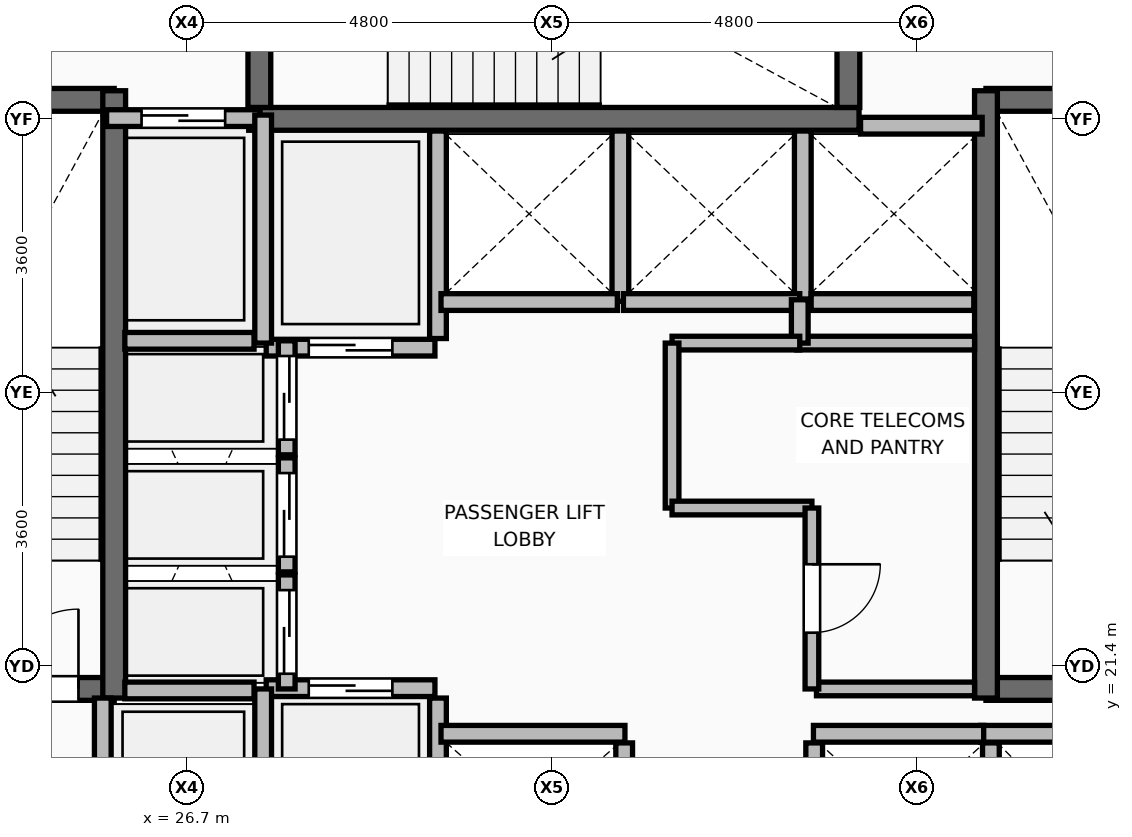
"""IFC4 building model, lengths in metres.
Left out: names, types, materials, properties, quantities, classifications, styles, units other than length and angle.
Written with IfcOpenShell. Run it as: python <this file> out.ifc"""

import sys

from ifc_helpers import new_model, si_unit, direction, frame, frame_2d, origin, place, context, subcontext, project, spatial, rectangle, extrude, element, fill, save


model = new_model("IFC4")
c1 = context("Model", 3, precision=1e-05, world=origin(), true_north=direction((0.0, 1.0)))
c2 = subcontext(c1, "Body", "Model", "MODEL_VIEW")
j1 = project(units=[si_unit("LENGTHUNIT", "METRE"), si_unit("PLANEANGLEUNIT", "RADIAN")], contexts=[c1])
p1 = place(None, origin())
s1 = spatial("IfcSite", under=j1, at=p1, CompositionType="ELEMENT")
p2 = place(p1, origin())
s2 = spatial("IfcBuilding", under=s1, at=p2, CompositionType="ELEMENT")
p3 = place(p2, frame((0.0, 0.0, 79.5)))
s3 = spatial("IfcBuildingStorey", under=s2, at=p3, CompositionType="ELEMENT", Elevation=79.5)
p4 = place(p3, frame((30.0, 18.08, 0.0), z_axis=(0.0, 0.0, 1.0), x_axis=(0.0, 1.0, 0.0)))
e1 = element("IfcWall", 1, at=p4, inside=s3, PredefinedType="PARTITIONING", context=c2, shape_type="SweptSolid", body=[
    extrude(rectangle(XDim=2.9, YDim=0.22, at=frame_2d((1.45, 0.0))), origin(), (0.0, 0.0, 1.0), 3.545),
])
for number, where, z_axis, x_axis in (
    (2, (32.45, 17.92, 0.0), (0.0, 0.0, 1.0), (0.0, 1.0, 0.0)),
    (3, (34.95, 17.92, 0.0), (0.0, 0.0, 1.0), (0.0, 1.0, 0.0)),
):
    element("IfcWall", number, at=place(p3, frame(where, z_axis=z_axis, x_axis=x_axis)), inside=s3, PredefinedType="PARTITIONING", context=c2, shape_type="SweptSolid", body=[
        extrude(rectangle(XDim=2.47, YDim=0.22, at=frame_2d((1.235, 0.0))), origin(), (0.0, 0.0, 1.0), 2.928),
    ])
p5 = place(p3, frame((37.275, 18.08, 0.0), z_axis=(0.0, 0.0, 1.0), x_axis=(0.0, 1.0, 0.0)))
e4 = element("IfcWall", 4, at=p5, inside=s3, PredefinedType="PARTITIONING", context=c2, shape_type="SweptSolid", body=[
    extrude(rectangle(XDim=2.31, YDim=0.22, at=frame_2d((1.155, 0.0))), origin(), (0.0, 0.0, 1.0), 3.545),
])
p6 = place(p3, frame((30.0, 25.71, 0.0), z_axis=(0.0, 0.0, 1.0), x_axis=(0.0, 1.0, 0.0)))
e5 = element("IfcWall", 5, at=p6, inside=s3, PredefinedType="PARTITIONING", context=c2, shape_type="SweptSolid", body=[
    extrude(rectangle(XDim=2.73, YDim=0.22, at=frame_2d((1.365, 0.0))), origin(), (0.0, 0.0, 1.0), 3.545),
])
p7 = place(p3, frame((32.4, 26.2, 0.0), z_axis=(0.0, 0.0, 1.0), x_axis=(0.0, 1.0, 0.0)))
e6 = element("IfcWall", 6, at=p7, inside=s3, PredefinedType="PARTITIONING", context=c2, shape_type="SweptSolid", body=[
    extrude(rectangle(XDim=2.24, YDim=0.22, at=frame_2d((1.12, 0.0))), origin(), (0.0, 0.0, 1.0), 3.545),
])
p8 = place(p3, frame((34.8, 26.23, 0.0), z_axis=(0.0, 0.0, 1.0), x_axis=(0.0, 1.0, 0.0)))
e7 = element("IfcWall", 7, at=p8, inside=s3, PredefinedType="PARTITIONING", context=c2, shape_type="SweptSolid", body=[
    extrude(rectangle(XDim=2.21, YDim=0.22, at=frame_2d((1.105, 0.0))), origin(), (0.0, 0.0, 1.0), 3.545),
])
p9 = place(p3, frame((34.91, 26.19, 0.0), z_axis=(0.0, 0.0, 1.0), x_axis=(1.0, 0.0, 0.0)))
e8 = element("IfcWall", 8, at=p9, inside=s3, PredefinedType="PARTITIONING", context=c2, shape_type="SweptSolid", body=[
    extrude(rectangle(XDim=2.14, YDim=0.22, at=frame_2d((1.07, 0.0))), origin(), (0.0, 0.0, 1.0), 3.545),
])
p10 = place(p3, frame((22.225, 21.1, 0.0), z_axis=(0.0, 0.0, 1.0), x_axis=(1.0, 0.0, 0.0)))
e9 = element("IfcWall", 9, at=p10, inside=s3, PredefinedType="SHEAR", context=c2, shape_type="SweptSolid", body=[
    extrude(rectangle(XDim=3.515, YDim=0.3, at=frame_2d((1.757, 0.0))), origin(), (0.0, 0.0, 1.0), 3.57),
])
p11 = place(p10, frame((1.995, 0.0, 0.0)))
e10 = element("IfcOpeningElement", 10, at=p11, cuts=e9, PredefinedType="OPENING", context=c2, shape_type="SweptSolid", body=[
    extrude(rectangle(XDim=1.05, YDim=2.1, at=frame_2d((0.525, 1.05))), frame((0.0, 0.16, 0.0), z_axis=(0.0, -1.0, 0.0), x_axis=(1.0, 0.0, 0.0)), (0.0, 0.0, 1.0), 0.32),
])
p12 = place(p3, frame((22.225, 28.85, 0.0), z_axis=(0.0, 0.0, 1.0), x_axis=(1.0, 0.0, 0.0)))
e11 = element("IfcWall", 11, at=p12, inside=s3, PredefinedType="SHEAR", context=c2, shape_type="SweptSolid", body=[
    extrude(rectangle(XDim=3.515, YDim=0.3, at=frame_2d((1.757, 0.0))), origin(), (0.0, 0.0, 1.0), 3.57),
])
p13 = place(p3, frame((25.74, 20.98, 0.0), z_axis=(0.0, 0.0, 1.0), x_axis=(0.0, 1.0, 0.0)))
e12 = element("IfcWall", 12, at=p13, inside=s3, PredefinedType="SHEAR", context=c2, shape_type="SweptSolid", body=[
    extrude(rectangle(XDim=7.99, YDim=0.3, at=frame_2d((3.995, 0.0))), origin(), (0.0, 0.0, 1.0), 3.57),
])
for number, where, z_axis, x_axis in (
    (13, (37.21, 21.1, 0.0), (0.0, 0.0, 1.0), (1.0, 0.0, 0.0)),
    (14, (37.21, 28.85, 0.0), (0.0, 0.0, 1.0), (1.0, 0.0, 0.0)),
):
    element("IfcWall", number, at=place(p3, frame(where, z_axis=z_axis, x_axis=x_axis)), inside=s3, PredefinedType="SHEAR", context=c2, shape_type="SweptSolid", body=[
        extrude(rectangle(XDim=3.565, YDim=0.3, at=frame_2d((1.782, 0.0))), origin(), (0.0, 0.0, 1.0), 3.57),
    ])
p14 = place(p3, frame((37.21, 20.98, 0.0), z_axis=(0.0, 0.0, 1.0), x_axis=(0.0, 1.0, 0.0)))
e15 = element("IfcWall", 15, at=p14, inside=s3, PredefinedType="SHEAR", context=c2, shape_type="SweptSolid", body=[
    extrude(rectangle(XDim=7.99, YDim=0.3, at=frame_2d((3.995, 0.0))), origin(), (0.0, 0.0, 1.0), 3.57),
])
p15 = place(p3, frame((27.51, 28.6, 0.0), z_axis=(0.0, 0.0, 1.0), x_axis=(1.0, 0.0, 0.0)))
e16 = element("IfcWall", 16, at=p15, inside=s3, PredefinedType="SHEAR", context=c2, shape_type="SweptSolid", body=[
    extrude(rectangle(XDim=8.03, YDim=0.3, at=frame_2d((4.015, 0.0))), origin(), (0.0, 0.0, 1.0), 3.57),
])
p16 = place(p3, frame((27.65, 28.75, 0.0), z_axis=(0.0, 0.0, 1.0), x_axis=(0.0, 1.0, 0.0)))
e17 = element("IfcWall", 17, at=p16, inside=s3, PredefinedType="SHEAR", context=c2, shape_type="SweptSolid", body=[
    extrude(rectangle(XDim=3.375, YDim=0.3, at=frame_2d((1.688, 0.0))), origin(), (0.0, 0.0, 1.0), 3.57),
])
p17 = place(p16, frame((1.0, 0.0, 0.0)))
e18 = element("IfcOpeningElement", 18, at=p17, cuts=e17, PredefinedType="OPENING", context=c2, shape_type="SweptSolid", body=[
    extrude(rectangle(XDim=1.05, YDim=2.1, at=frame_2d((0.525, 1.05))), frame((0.0, 0.16, 0.0), z_axis=(0.0, -1.0, 0.0), x_axis=(1.0, 0.0, 0.0)), (0.0, 0.0, 1.0), 0.32),
])
p18 = place(p3, frame((35.4, 28.75, 0.0), z_axis=(0.0, 0.0, 1.0), x_axis=(0.0, 1.0, 0.0)))
e19 = element("IfcWall", 19, at=p18, inside=s3, PredefinedType="SHEAR", context=c2, shape_type="SweptSolid", body=[
    extrude(rectangle(XDim=3.375, YDim=0.3, at=frame_2d((1.688, 0.0))), origin(), (0.0, 0.0, 1.0), 3.57),
])
p19 = place(p3, frame((25.59, 18.22, 0.0), z_axis=(0.0, 0.0, 1.0), x_axis=(0.0, 1.0, 0.0)))
e20 = element("IfcWall", 20, at=p19, inside=s3, PredefinedType="PARTITIONING", context=c2, shape_type="SweptSolid", body=[
    extrude(rectangle(XDim=2.76, YDim=0.22, at=frame_2d((1.38, 0.0))), origin(), (0.0, 0.0, 1.0), 3.55),
])
p20 = place(p19, frame((0.83, 0.0, 0.0)))
e21 = element("IfcOpeningElement", 21, at=p20, cuts=e20, PredefinedType="OPENING", context=c2, shape_type="SweptSolid", body=[
    extrude(rectangle(XDim=1.1, YDim=2.2, at=frame_2d((0.55, 1.1))), frame((0.0, 0.12, 0.0), z_axis=(0.0, -1.0, 0.0), x_axis=(1.0, 0.0, 0.0)), (0.0, 0.0, 1.0), 0.24),
])
p21 = place(p3, frame((25.64, 28.61, 0.0), z_axis=(0.0, 0.0, 1.0), x_axis=(1.0, 0.0, 0.0)))
e22 = element("IfcWall", 22, at=p21, inside=s3, PredefinedType="PARTITIONING", context=c2, shape_type="SweptSolid", body=[
    extrude(rectangle(XDim=2.02, YDim=0.22, at=frame_2d((1.01, 0.0))), origin(), (0.0, 0.0, 1.0), 3.55),
])
p22 = place(p21, frame((0.46, 0.0, 0.0)))
e23 = element("IfcOpeningElement", 23, at=p22, cuts=e22, PredefinedType="OPENING", context=c2, shape_type="SweptSolid", body=[
    extrude(rectangle(XDim=1.1, YDim=2.2, at=frame_2d((0.55, 1.1))), frame((0.0, 0.12, 0.0), z_axis=(0.0, -1.0, 0.0), x_axis=(1.0, 0.0, 0.0)), (0.0, 0.0, 1.0), 0.24),
])
p23 = place(p3, frame((27.74, 21.11, 0.0), z_axis=(0.0, 0.0, 1.0), x_axis=(1.0, 0.0, 0.0)))
e24 = element("IfcWall", 24, at=p23, inside=s3, PredefinedType="PARTITIONING", context=c2, shape_type="SweptSolid", body=[
    extrude(rectangle(XDim=2.22, YDim=0.22, at=frame_2d((1.11, 0.0))), origin(), (0.0, 0.0, 1.0), 3.55),
])
p24 = place(p23, frame((0.56, 0.0, 0.0)))
e25 = element("IfcOpeningElement", 25, at=p24, cuts=e24, PredefinedType="OPENING", context=c2, shape_type="SweptSolid", body=[
    extrude(rectangle(XDim=1.1, YDim=2.2, at=frame_2d((0.55, 1.1))), frame((0.0, 0.12, 0.0), z_axis=(0.0, -1.0, 0.0), x_axis=(1.0, 0.0, 0.0)), (0.0, 0.0, 1.0), 0.24),
])
p25 = place(p3, frame((27.74, 25.59, 0.0), z_axis=(0.0, 0.0, 1.0), x_axis=(1.0, 0.0, 0.0)))
e26 = element("IfcWall", 26, at=p25, inside=s3, PredefinedType="PARTITIONING", context=c2, shape_type="SweptSolid", body=[
    extrude(rectangle(XDim=2.22, YDim=0.22, at=frame_2d((1.11, 0.0))), origin(), (0.0, 0.0, 1.0), 3.55),
])
p26 = place(p25, frame((0.56, 0.0, 0.0)))
e27 = element("IfcOpeningElement", 27, at=p26, cuts=e26, PredefinedType="OPENING", context=c2, shape_type="SweptSolid", body=[
    extrude(rectangle(XDim=1.1, YDim=2.2, at=frame_2d((0.55, 1.1))), frame((0.0, 0.12, 0.0), z_axis=(0.0, -1.0, 0.0), x_axis=(1.0, 0.0, 0.0)), (0.0, 0.0, 1.0), 0.24),
])
p27 = place(p3, frame((30.04, 20.51, 0.0), z_axis=(0.0, 0.0, 1.0), x_axis=(1.0, 0.0, 0.0)))
e28 = element("IfcWall", 28, at=p27, inside=s3, PredefinedType="PARTITIONING", context=c2, shape_type="SweptSolid", body=[
    extrude(rectangle(XDim=2.42, YDim=0.22, at=frame_2d((1.21, 0.0))), origin(), (0.0, 0.0, 1.0), 3.55),
])
for number, where, z_axis, x_axis in (
    (29, (37.14, 20.51, 0.0), (0.0, 0.0, 1.0), (1.0, 0.0, 0.0)),
    (30, (34.94, 20.51, 0.0), (0.0, 0.0, 1.0), (1.0, 0.0, 0.0)),
):
    element("IfcWall", number, at=place(p3, frame(where, z_axis=z_axis, x_axis=x_axis)), inside=s3, PredefinedType="PARTITIONING", context=c2, shape_type="SweptSolid", body=[
        extrude(rectangle(XDim=2.24, YDim=0.22, at=frame_2d((1.12, 0.0))), origin(), (0.0, 0.0, 1.0), 3.55),
    ])
for number, where, z_axis, x_axis in (
    (31, (30.04, 26.19, 0.0), (0.0, 0.0, 1.0), (1.0, 0.0, 0.0)),
    (32, (32.44, 26.19, 0.0), (0.0, 0.0, 1.0), (1.0, 0.0, 0.0)),
):
    element("IfcWall", number, at=place(p3, frame(where, z_axis=z_axis, x_axis=x_axis)), inside=s3, PredefinedType="PARTITIONING", context=c2, shape_type="SweptSolid", body=[
        extrude(rectangle(XDim=2.32, YDim=0.22, at=frame_2d((1.16, 0.0))), origin(), (0.0, 0.0, 1.0), 3.55),
    ])
p28 = place(p3, frame((35.56, 28.51, 0.0), z_axis=(0.0, 0.0, 1.0), x_axis=(1.0, 0.0, 0.0)))
e33 = element("IfcWall", 33, at=p28, inside=s3, PredefinedType="PARTITIONING", context=c2, shape_type="SweptSolid", body=[
    extrude(rectangle(XDim=1.6, YDim=0.22, at=frame_2d((0.8, 0.0))), origin(), (0.0, 0.0, 1.0), 3.55),
])
p29 = place(p3, frame((28.01, 21.1, 0.0), z_axis=(0.0, 0.0, 1.0), x_axis=(0.0, 1.0, 0.0)))
e34 = element("IfcWall", 34, at=p29, inside=s3, PredefinedType="PARTITIONING", context=c2, shape_type="SweptSolid", body=[
    extrude(rectangle(XDim=1.5, YDim=0.22, at=frame_2d((0.75, 0.0))), origin(), (0.0, 0.0, 1.0), 3.55),
])
p30 = place(p29, frame((0.2, 0.0, 0.0)))
e35 = element("IfcOpeningElement", 35, at=p30, cuts=e34, PredefinedType="OPENING", context=c2, shape_type="SweptSolid", body=[
    extrude(rectangle(XDim=1.1, YDim=2.2, at=frame_2d((0.55, 1.1))), frame((0.0, 0.12, 0.0), z_axis=(0.0, -1.0, 0.0), x_axis=(1.0, 0.0, 0.0)), (0.0, 0.0, 1.0), 0.24),
])
p31 = place(p3, frame((28.01, 22.64, 0.0), z_axis=(0.0, 0.0, 1.0), x_axis=(0.0, 1.0, 0.0)))
e36 = element("IfcWall", 36, at=p31, inside=s3, PredefinedType="PARTITIONING", context=c2, shape_type="SweptSolid", body=[
    extrude(rectangle(XDim=1.5, YDim=0.22, at=frame_2d((0.75, 0.0))), origin(), (0.0, 0.0, 1.0), 3.55),
])
p32 = place(p31, frame((0.2, 0.0, 0.0)))
e37 = element("IfcOpeningElement", 37, at=p32, cuts=e36, PredefinedType="OPENING", context=c2, shape_type="SweptSolid", body=[
    extrude(rectangle(XDim=1.1, YDim=2.2, at=frame_2d((0.55, 1.1))), frame((0.0, 0.12, 0.0), z_axis=(0.0, -1.0, 0.0), x_axis=(1.0, 0.0, 0.0)), (0.0, 0.0, 1.0), 0.24),
])
p33 = place(p3, frame((28.01, 24.18, 0.0), z_axis=(0.0, 0.0, 1.0), x_axis=(0.0, 1.0, 0.0)))
e38 = element("IfcWall", 38, at=p33, inside=s3, PredefinedType="PARTITIONING", context=c2, shape_type="SweptSolid", body=[
    extrude(rectangle(XDim=1.5, YDim=0.22, at=frame_2d((0.75, 0.0))), origin(), (0.0, 0.0, 1.0), 3.55),
])
p34 = place(p33, frame((0.2, 0.0, 0.0)))
e39 = element("IfcOpeningElement", 39, at=p34, cuts=e38, PredefinedType="OPENING", context=c2, shape_type="SweptSolid", body=[
    extrude(rectangle(XDim=1.1, YDim=2.2, at=frame_2d((0.55, 1.1))), frame((0.0, 0.12, 0.0), z_axis=(0.0, -1.0, 0.0), x_axis=(1.0, 0.0, 0.0)), (0.0, 0.0, 1.0), 0.24),
])
p35 = place(p3, frame((27.7, 18.15, 0.0), z_axis=(0.0, 0.0, 1.0), x_axis=(0.0, 1.0, 0.0)))
e40 = element("IfcWall", 40, at=p35, inside=s3, PredefinedType="PARTITIONING", context=c2, shape_type="SweptSolid", body=[
    extrude(rectangle(XDim=2.95, YDim=0.22, at=frame_2d((1.475, 0.0))), origin(), (0.0, 0.0, 1.0), 3.55),
])
p36 = place(p3, frame((27.7, 25.65, 0.0), z_axis=(0.0, 0.0, 1.0), x_axis=(0.0, 1.0, 0.0)))
e41 = element("IfcWall", 41, at=p36, inside=s3, PredefinedType="PARTITIONING", context=c2, shape_type="SweptSolid", body=[
    extrude(rectangle(XDim=3.0, YDim=0.22, at=frame_2d((1.5, 0.0))), origin(), (0.0, 0.0, 1.0), 3.55),
])
for number, where, z_axis, x_axis in (
    (42, (25.88, 21.08, 0.0), (0.0, 0.0, 1.0), (1.0, 0.0, 0.0)),
    (43, (25.88, 25.68, 0.0), (0.0, 0.0, 1.0), (1.0, 0.0, 0.0)),
):
    element("IfcWall", number, at=place(p3, frame(where, z_axis=z_axis, x_axis=x_axis)), inside=s3, PredefinedType="PARTITIONING", context=c2, shape_type="SweptSolid", body=[
        extrude(rectangle(XDim=1.7, YDim=0.22, at=frame_2d((0.85, 0.0))), origin(), (0.0, 0.0, 1.0), 3.55),
    ])
p37 = place(p3, frame((34.98, 21.1, 0.0), z_axis=(0.0, 0.0, 1.0), x_axis=(1.0, 0.0, 0.0)))
e44 = element("IfcWall", 44, at=p37, inside=s3, PredefinedType="PARTITIONING", context=c2, shape_type="SweptSolid", body=[
    extrude(rectangle(XDim=2.08, YDim=0.18, at=frame_2d((1.04, 0.0))), origin(), (0.0, 0.0, 1.0), 3.55),
])
p38 = place(p3, frame((34.72, 25.65, 0.0), z_axis=(0.0, 0.0, 1.0), x_axis=(1.0, 0.0, 0.0)))
e45 = element("IfcWall", 45, at=p38, inside=s3, PredefinedType="PARTITIONING", context=c2, shape_type="SweptSolid", body=[
    extrude(rectangle(XDim=2.34, YDim=0.18, at=frame_2d((1.17, 0.0))), origin(), (0.0, 0.0, 1.0), 3.55),
])
p39 = place(p3, frame((34.76, 25.65, 0.0), z_axis=(0.0, 0.0, 1.0), x_axis=(0.0, 1.0, 0.0)))
e46 = element("IfcWall", 46, at=p39, inside=s3, PredefinedType="PARTITIONING", context=c2, shape_type="SweptSolid", body=[
    extrude(rectangle(XDim=0.57, YDim=0.22, at=frame_2d((0.285, 0.0))), origin(), (0.0, 0.0, 1.0), 3.55),
])
p40 = place(p3, frame((33.08, 25.65, 0.0), z_axis=(0.0, 0.0, 1.0), x_axis=(1.0, 0.0, 0.0)))
e47 = element("IfcWall", 47, at=p40, inside=s3, PredefinedType="PARTITIONING", context=c2, shape_type="SweptSolid", body=[
    extrude(rectangle(XDim=1.68, YDim=0.18, at=frame_2d((0.84, 0.0))), origin(), (0.0, 0.0, 1.0), 3.55),
])
p41 = place(p3, frame((33.08, 23.48, 0.0), z_axis=(0.0, 0.0, 1.0), x_axis=(0.0, 1.0, 0.0)))
e48 = element("IfcWall", 48, at=p41, inside=s3, PredefinedType="PARTITIONING", context=c2, shape_type="SweptSolid", body=[
    extrude(rectangle(XDim=2.17, YDim=0.18, at=frame_2d((1.085, 0.0))), origin(), (0.0, 0.0, 1.0), 3.55),
])
p42 = place(p3, frame((33.08, 23.48, 0.0), z_axis=(0.0, 0.0, 1.0), x_axis=(1.0, 0.0, 0.0)))
e49 = element("IfcWall", 49, at=p42, inside=s3, PredefinedType="PARTITIONING", context=c2, shape_type="SweptSolid", body=[
    extrude(rectangle(XDim=1.84, YDim=0.18, at=frame_2d((0.92, 0.0))), origin(), (0.0, 0.0, 1.0), 3.55),
])
p43 = place(p3, frame((34.92, 21.1, 0.0), z_axis=(0.0, 0.0, 1.0), x_axis=(0.0, 1.0, 0.0)))
e50 = element("IfcWall", 50, at=p43, inside=s3, PredefinedType="PARTITIONING", context=c2, shape_type="SweptSolid", body=[
    extrude(rectangle(XDim=2.38, YDim=0.18, at=frame_2d((1.19, 0.0))), origin(), (0.0, 0.0, 1.0), 3.55),
])
p44 = place(p43, frame((0.74, 0.0, 0.0)))
e51 = element("IfcOpeningElement", 51, at=p44, cuts=e50, PredefinedType="OPENING", context=c2, shape_type="SweptSolid", body=[
    extrude(rectangle(XDim=0.9, YDim=2.1, at=frame_2d((0.45, 1.05))), frame((0.0, 0.1, 0.0), z_axis=(0.0, -1.0, 0.0), x_axis=(1.0, 0.0, 0.0)), (0.0, 0.0, 1.0), 0.2),
])
p45 = place(p11, origin())
e52 = element("IfcDoor", 52, at=p45, inside=s3, OperationType="SINGLE_SWING_RIGHT", PredefinedType="DOOR", context=c2, shape_type="SweptSolid", body=[
    extrude(rectangle(XDim=1.05, YDim=2.1, at=frame_2d((0.525, 1.05))), frame((0.0, 0.025, 0.0), z_axis=(0.0, -1.0, 0.0), x_axis=(1.0, 0.0, 0.0)), (0.0, 0.0, 1.0), 0.05),
])
fill(e10, e52)
p46 = place(p22, origin())
e53 = element("IfcDoor", 53, at=p46, inside=s3, OperationType="DOUBLE_DOOR_SLIDING", PredefinedType="DOOR", context=c2, shape_type="SweptSolid", body=[
    extrude(rectangle(XDim=1.1, YDim=2.2, at=frame_2d((0.55, 1.1))), frame((0.0, 0.025, 0.0), z_axis=(0.0, -1.0, 0.0), x_axis=(1.0, 0.0, 0.0)), (0.0, 0.0, 1.0), 0.05),
])
fill(e23, e53)
p47 = place(p24, origin())
e54 = element("IfcDoor", 54, at=p47, inside=s3, OperationType="DOUBLE_DOOR_SLIDING", PredefinedType="DOOR", context=c2, shape_type="SweptSolid", body=[
    extrude(rectangle(XDim=1.1, YDim=2.2, at=frame_2d((0.55, 1.1))), frame((0.0, 0.025, 0.0), z_axis=(0.0, -1.0, 0.0), x_axis=(1.0, 0.0, 0.0)), (0.0, 0.0, 1.0), 0.05),
])
fill(e25, e54)
p48 = place(p26, frame((1.1, 0.0, 0.0), z_axis=(0.0, 0.0, 1.0), x_axis=(-1.0, 0.0, 0.0)))
e55 = element("IfcDoor", 55, at=p48, inside=s3, OperationType="DOUBLE_DOOR_SLIDING", PredefinedType="DOOR", context=c2, shape_type="SweptSolid", body=[
    extrude(rectangle(XDim=1.1, YDim=2.2, at=frame_2d((0.55, 1.1))), frame((0.0, 0.025, 0.0), z_axis=(0.0, -1.0, 0.0), x_axis=(1.0, 0.0, 0.0)), (0.0, 0.0, 1.0), 0.05),
])
fill(e27, e55)
p49 = place(p30, frame((1.1, 0.0, 0.0), z_axis=(0.0, 0.0, 1.0), x_axis=(-1.0, 0.0, 0.0)))
e56 = element("IfcDoor", 56, at=p49, inside=s3, OperationType="DOUBLE_DOOR_SLIDING", PredefinedType="DOOR", context=c2, shape_type="SweptSolid", body=[
    extrude(rectangle(XDim=1.1, YDim=2.2, at=frame_2d((0.55, 1.1))), frame((0.0, 0.025, 0.0), z_axis=(0.0, -1.0, 0.0), x_axis=(1.0, 0.0, 0.0)), (0.0, 0.0, 1.0), 0.05),
])
fill(e35, e56)
p50 = place(p32, frame((1.1, 0.0, 0.0), z_axis=(0.0, 0.0, 1.0), x_axis=(-1.0, 0.0, 0.0)))
e57 = element("IfcDoor", 57, at=p50, inside=s3, OperationType="DOUBLE_DOOR_SLIDING", PredefinedType="DOOR", context=c2, shape_type="SweptSolid", body=[
    extrude(rectangle(XDim=1.1, YDim=2.2, at=frame_2d((0.55, 1.1))), frame((0.0, 0.025, 0.0), z_axis=(0.0, -1.0, 0.0), x_axis=(1.0, 0.0, 0.0)), (0.0, 0.0, 1.0), 0.05),
])
fill(e37, e57)
p51 = place(p34, frame((1.1, 0.0, 0.0), z_axis=(0.0, 0.0, 1.0), x_axis=(-1.0, 0.0, 0.0)))
e58 = element("IfcDoor", 58, at=p51, inside=s3, OperationType="DOUBLE_DOOR_SLIDING", PredefinedType="DOOR", context=c2, shape_type="SweptSolid", body=[
    extrude(rectangle(XDim=1.1, YDim=2.2, at=frame_2d((0.55, 1.1))), frame((0.0, 0.025, 0.0), z_axis=(0.0, -1.0, 0.0), x_axis=(1.0, 0.0, 0.0)), (0.0, 0.0, 1.0), 0.05),
])
fill(e39, e58)
p52 = place(p44, frame((0.9, 0.0, 0.0), z_axis=(0.0, 0.0, 1.0), x_axis=(-1.0, 0.0, 0.0)))
e59 = element("IfcDoor", 59, at=p52, inside=s3, OperationType="SINGLE_SWING_LEFT", PredefinedType="DOOR", context=c2, shape_type="SweptSolid", body=[
    extrude(rectangle(XDim=0.9, YDim=2.1, at=frame_2d((0.45, 1.05))), frame((0.0, 0.025, 0.0), z_axis=(0.0, -1.0, 0.0), x_axis=(1.0, 0.0, 0.0)), (0.0, 0.0, 1.0), 0.05),
])
fill(e51, e59)
save(model, sys.argv[1])
